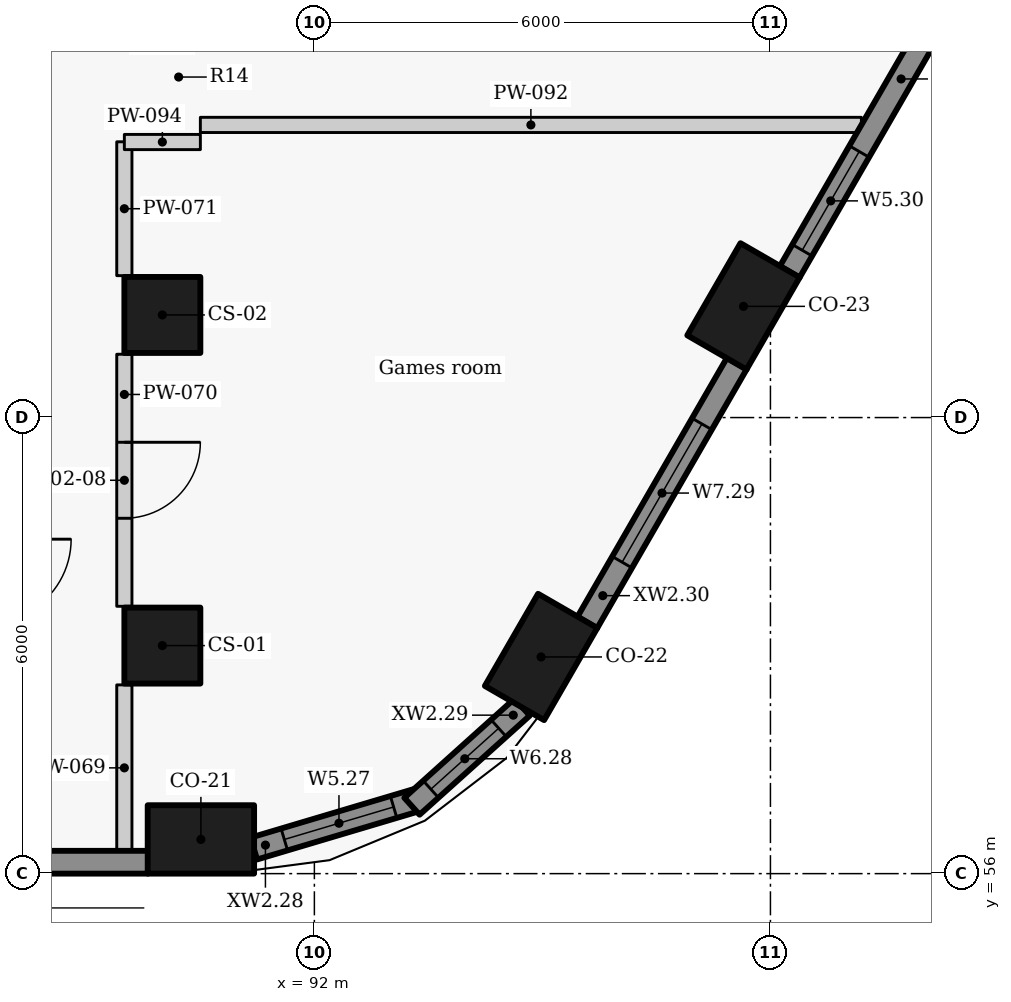
"""IFC4 building model, lengths in metres.
Left out: names, types, materials, properties, quantities, classifications, styles, units other than length and angle.
Written with IfcOpenShell. Run it as: python <this file> out.ifc"""

import sys

from ifc_helpers import new_model, si_unit, direction, frame, frame_2d, origin, origin_2d, place, context, subcontext, project, spatial, rectangle, extrude, element, fill, save


model = new_model("IFC4")
c1 = context("Model", 3, precision=1e-05, world=origin(), true_north=direction((0.0, 1.0)))
c2 = subcontext(c1, "Body", "Model", "MODEL_VIEW")
j1 = project(units=[si_unit("LENGTHUNIT", "METRE"), si_unit("PLANEANGLEUNIT", "RADIAN")], contexts=[c1])
p1 = place(None, origin())
s1 = spatial("IfcSite", under=j1, at=p1, CompositionType="ELEMENT")
p2 = place(p1, origin())
s2 = spatial("IfcBuilding", under=s1, at=p2, CompositionType="ELEMENT")
p3 = place(p2, frame((0.0, 0.0, 81.0)))
s3 = spatial("IfcBuildingStorey", under=s2, at=p3, CompositionType="ELEMENT", Elevation=81.0)
for number, where, z_axis, x_axis in (
    (1, (90.507, 56.45, 0.0), (0.0, 0.0, 1.0), (1.0, 0.0, 0.0)),
    (2, (94.982, 58.851, 0.0), (0.0, 0.0, 1.0), (0.5, 0.866, 0.0)),
    (3, (97.646, 63.463, 0.0), (0.0, 0.0, 1.0), (0.5, 0.866, 0.0)),
):
    element("IfcColumn", number, at=place(p3, frame(where, z_axis=z_axis, x_axis=x_axis)), inside=s3, PredefinedType="COLUMN", context=c2, shape_type="SweptSolid", body=[
        extrude(rectangle(XDim=1.4, YDim=0.9, at=origin_2d()), origin(), (0.0, 0.0, 1.0), 3.3),
    ])
for number, where, z_axis, x_axis in (
    (4, (90.0, 59.0, 0.0), (0.0, 0.0, 1.0), (0.0, 1.0, 0.0)),
    (5, (90.0, 63.35, 0.0), (0.0, 0.0, 1.0), (0.0, 1.0, 0.0)),
):
    element("IfcColumn", number, at=place(p3, frame(where, z_axis=z_axis, x_axis=x_axis)), inside=s3, PredefinedType="COLUMN", context=c2, shape_type="SweptSolid", body=[
        extrude(rectangle(XDim=1.0, YDim=1.0, at=origin_2d()), origin(), (0.0, 0.0, 1.0), 3.3),
    ])
p4 = place(p3, frame((69.871, 56.15, 0.0), z_axis=(0.0, 0.0, 1.0), x_axis=(1.0, 0.0, 0.0)))
e6 = element("IfcWall", 6, at=p4, inside=s3, PredefinedType="SOLIDWALL", context=c2, shape_type="SweptSolid", body=[
    extrude(rectangle(XDim=19.94, YDim=0.3, at=frame_2d((9.97, 0.0))), origin(), (0.0, 0.0, 1.0), 2.425),
])
p5 = place(p3, frame((91.203, 56.33, 0.0), z_axis=(0.0, 0.0, 1.0), x_axis=(0.95847736903, 0.285168604614, 0.0)))
e7 = element("IfcWall", 7, at=p5, inside=s3, PredefinedType="SOLIDWALL", context=c2, shape_type="SweptSolid", body=[
    extrude(rectangle(XDim=2.262, YDim=0.3, at=frame_2d((1.131, 0.0))), origin(), (0.0, 0.0, 1.0), 2.425),
])
p6 = place(p5, frame((0.419, 0.0, 0.9)))
e8 = element("IfcOpeningElement", 8, at=p6, cuts=e7, PredefinedType="OPENING", context=c2, shape_type="SweptSolid", body=[
    extrude(rectangle(XDim=1.5, YDim=1.1, at=frame_2d((0.75, 0.55))), frame((0.0, 0.16, 0.0), z_axis=(0.0, -1.0, 0.0), x_axis=(1.0, 0.0, 0.0)), (0.0, 0.0, 1.0), 0.32),
])
p7 = place(p3, frame((93.283, 56.887, 0.0), z_axis=(0.0, 0.0, 1.0), x_axis=(0.743785734967, 0.668418117992, 0.0)))
e9 = element("IfcWall", 9, at=p7, inside=s3, PredefinedType="SOLIDWALL", context=c2, shape_type="SweptSolid", body=[
    extrude(rectangle(XDim=1.95, YDim=0.3, at=frame_2d((0.975, 0.0))), origin(), (0.0, 0.0, 1.0), 2.425),
])
p8 = place(p7, frame((0.335, 0.0, 0.9)))
e10 = element("IfcOpeningElement", 10, at=p8, cuts=e9, PredefinedType="OPENING", context=c2, shape_type="SweptSolid", body=[
    extrude(rectangle(XDim=1.2, YDim=1.1, at=frame_2d((0.6, 0.55))), frame((0.0, 0.16, 0.0), z_axis=(0.0, -1.0, 0.0), x_axis=(1.0, 0.0, 0.0)), (0.0, 0.0, 1.0), 0.32),
])
p9 = place(p3, frame((95.59, 59.303, 0.0), z_axis=(0.0, 0.0, 1.0), x_axis=(0.500003583557, 0.866023334807, 0.0)))
e11 = element("IfcWall", 11, at=p9, inside=s3, PredefinedType="SOLIDWALL", context=c2, shape_type="SweptSolid", body=[
    extrude(rectangle(XDim=3.934, YDim=0.3, at=frame_2d((1.967, 0.0))), origin(), (0.0, 0.0, 1.0), 2.425),
])
p10 = place(p9, frame((0.917, 0.0, 0.9)))
e12 = element("IfcOpeningElement", 12, at=p10, cuts=e11, PredefinedType="OPENING", context=c2, shape_type="SweptSolid", body=[
    extrude(rectangle(XDim=2.1, YDim=1.1, at=frame_2d((1.05, 0.55))), frame((0.0, 0.16, 0.0), z_axis=(0.0, -1.0, 0.0), x_axis=(1.0, 0.0, 0.0)), (0.0, 0.0, 1.0), 0.32),
])
p11 = place(p3, frame((98.253, 63.916, 0.0), z_axis=(0.0, 0.0, 1.0), x_axis=(0.499957037901, 0.866050206543, 0.0)))
e13 = element("IfcWall", 13, at=p11, inside=s3, PredefinedType="SOLIDWALL", context=c2, shape_type="SweptSolid", body=[
    extrude(rectangle(XDim=3.934, YDim=0.3, at=frame_2d((1.967, 0.0))), origin(), (0.0, 0.0, 1.0), 2.425),
])
p12 = place(p11, frame((0.33, 0.0, 0.9)))
e14 = element("IfcOpeningElement", 14, at=p12, cuts=e13, PredefinedType="OPENING", context=c2, shape_type="SweptSolid", body=[
    extrude(rectangle(XDim=1.5, YDim=1.1, at=frame_2d((0.75, 0.55))), frame((0.0, 0.16, 0.0), z_axis=(0.0, -1.0, 0.0), x_axis=(1.0, 0.0, 0.0)), (0.0, 0.0, 1.0), 0.32),
])
p13 = place(p3, frame((89.5, 56.3, 0.0), z_axis=(0.0, 0.0, 1.0), x_axis=(0.0, 1.0, 0.0)))
e15 = element("IfcWall", 15, at=p13, inside=s3, PredefinedType="PARTITIONING", context=c2, shape_type="SweptSolid", body=[
    extrude(rectangle(XDim=2.183, YDim=0.2, at=frame_2d((1.091, 0.0))), origin(), (0.0, 0.0, 1.0), 3.025),
])
p14 = place(p3, frame((89.5, 62.833, 0.0), z_axis=(0.0, 0.0, 1.0), x_axis=(0.0, -1.0, 0.0)))
e16 = element("IfcWall", 16, at=p14, inside=s3, PredefinedType="PARTITIONING", context=c2, shape_type="SweptSolid", body=[
    extrude(rectangle(XDim=3.316, YDim=0.2, at=frame_2d((1.658, 0.0))), origin(), (0.0, 0.0, 1.0), 3.025),
])
p15 = place(p14, frame((1.158, 0.0, 0.0)))
e17 = element("IfcOpeningElement", 17, at=p15, cuts=e16, PredefinedType="OPENING", context=c2, shape_type="SweptSolid", body=[
    extrude(rectangle(XDim=1.0, YDim=2.1, at=frame_2d((0.5, 1.05))), frame((0.0, 0.11, 0.0), z_axis=(0.0, -1.0, 0.0), x_axis=(1.0, 0.0, 0.0)), (0.0, 0.0, 1.0), 0.22),
])
p16 = place(p3, frame((89.5, 63.867, 0.0), z_axis=(0.0, 0.0, 1.0), x_axis=(0.0, 1.0, 0.0)))
e18 = element("IfcWall", 18, at=p16, inside=s3, PredefinedType="PARTITIONING", context=c2, shape_type="SweptSolid", body=[
    extrude(rectangle(XDim=1.761, YDim=0.2, at=frame_2d((0.88, 0.0))), origin(), (0.0, 0.0, 1.0), 3.025),
])
p17 = place(p3, frame((90.5, 65.85, 0.0), z_axis=(0.0, 0.0, 1.0), x_axis=(1.0, 0.0, 0.0)))
e19 = element("IfcWall", 19, at=p17, inside=s3, PredefinedType="PARTITIONING", context=c2, shape_type="SweptSolid", body=[
    extrude(rectangle(XDim=8.697, YDim=0.2, at=frame_2d((4.349, 0.0))), origin(), (0.0, 0.0, 1.0), 2.405),
])
p18 = place(p3, frame((89.5, 65.625, 0.0), z_axis=(0.0, 0.0, 1.0), x_axis=(1.0, 0.0, 0.0)))
e20 = element("IfcWall", 20, at=p18, inside=s3, PredefinedType="PARTITIONING", context=c2, shape_type="SweptSolid", body=[
    extrude(rectangle(XDim=1.0, YDim=0.2, at=frame_2d((0.5, 0.0))), origin(), (0.0, 0.0, 1.0), 2.505),
])
p19 = place(p6, origin())
e21 = element("IfcWindow", 21, at=p19, inside=s3, PartitioningType="SINGLE_PANEL", PredefinedType="WINDOW", context=c2, shape_type="SweptSolid", body=[
    extrude(rectangle(XDim=1.5, YDim=1.1, at=frame_2d((0.75, 0.55))), frame((0.0, 0.03, 0.0), z_axis=(0.0, -1.0, 0.0), x_axis=(1.0, 0.0, 0.0)), (0.0, 0.0, 1.0), 0.06),
])
fill(e8, e21)
p20 = place(p8, origin())
e22 = element("IfcWindow", 22, at=p20, inside=s3, PartitioningType="SINGLE_PANEL", PredefinedType="WINDOW", context=c2, shape_type="SweptSolid", body=[
    extrude(rectangle(XDim=1.2, YDim=1.1, at=frame_2d((0.6, 0.55))), frame((0.0, 0.03, 0.0), z_axis=(0.0, -1.0, 0.0), x_axis=(1.0, 0.0, 0.0)), (0.0, 0.0, 1.0), 0.06),
])
fill(e10, e22)
p21 = place(p10, origin())
e23 = element("IfcWindow", 23, at=p21, inside=s3, PartitioningType="SINGLE_PANEL", PredefinedType="WINDOW", context=c2, shape_type="SweptSolid", body=[
    extrude(rectangle(XDim=2.1, YDim=1.1, at=frame_2d((1.05, 0.55))), frame((0.0, 0.03, 0.0), z_axis=(0.0, -1.0, 0.0), x_axis=(1.0, 0.0, 0.0)), (0.0, 0.0, 1.0), 0.06),
])
fill(e12, e23)
p22 = place(p12, origin())
e24 = element("IfcWindow", 24, at=p22, inside=s3, PartitioningType="SINGLE_PANEL", PredefinedType="WINDOW", context=c2, shape_type="SweptSolid", body=[
    extrude(rectangle(XDim=1.5, YDim=1.1, at=frame_2d((0.75, 0.55))), frame((0.0, 0.03, 0.0), z_axis=(0.0, -1.0, 0.0), x_axis=(1.0, 0.0, 0.0)), (0.0, 0.0, 1.0), 0.06),
])
fill(e14, e24)
p23 = place(p15, origin())
e25 = element("IfcDoor", 25, at=p23, inside=s3, OperationType="SINGLE_SWING_LEFT", PredefinedType="DOOR", context=c2, shape_type="SweptSolid", body=[
    extrude(rectangle(XDim=1.0, YDim=2.1, at=frame_2d((0.5, 1.05))), frame((0.0, 0.025, 0.0), z_axis=(0.0, -1.0, 0.0), x_axis=(1.0, 0.0, 0.0)), (0.0, 0.0, 1.0), 0.05),
])
fill(e17, e25)
save(model, sys.argv[1])
